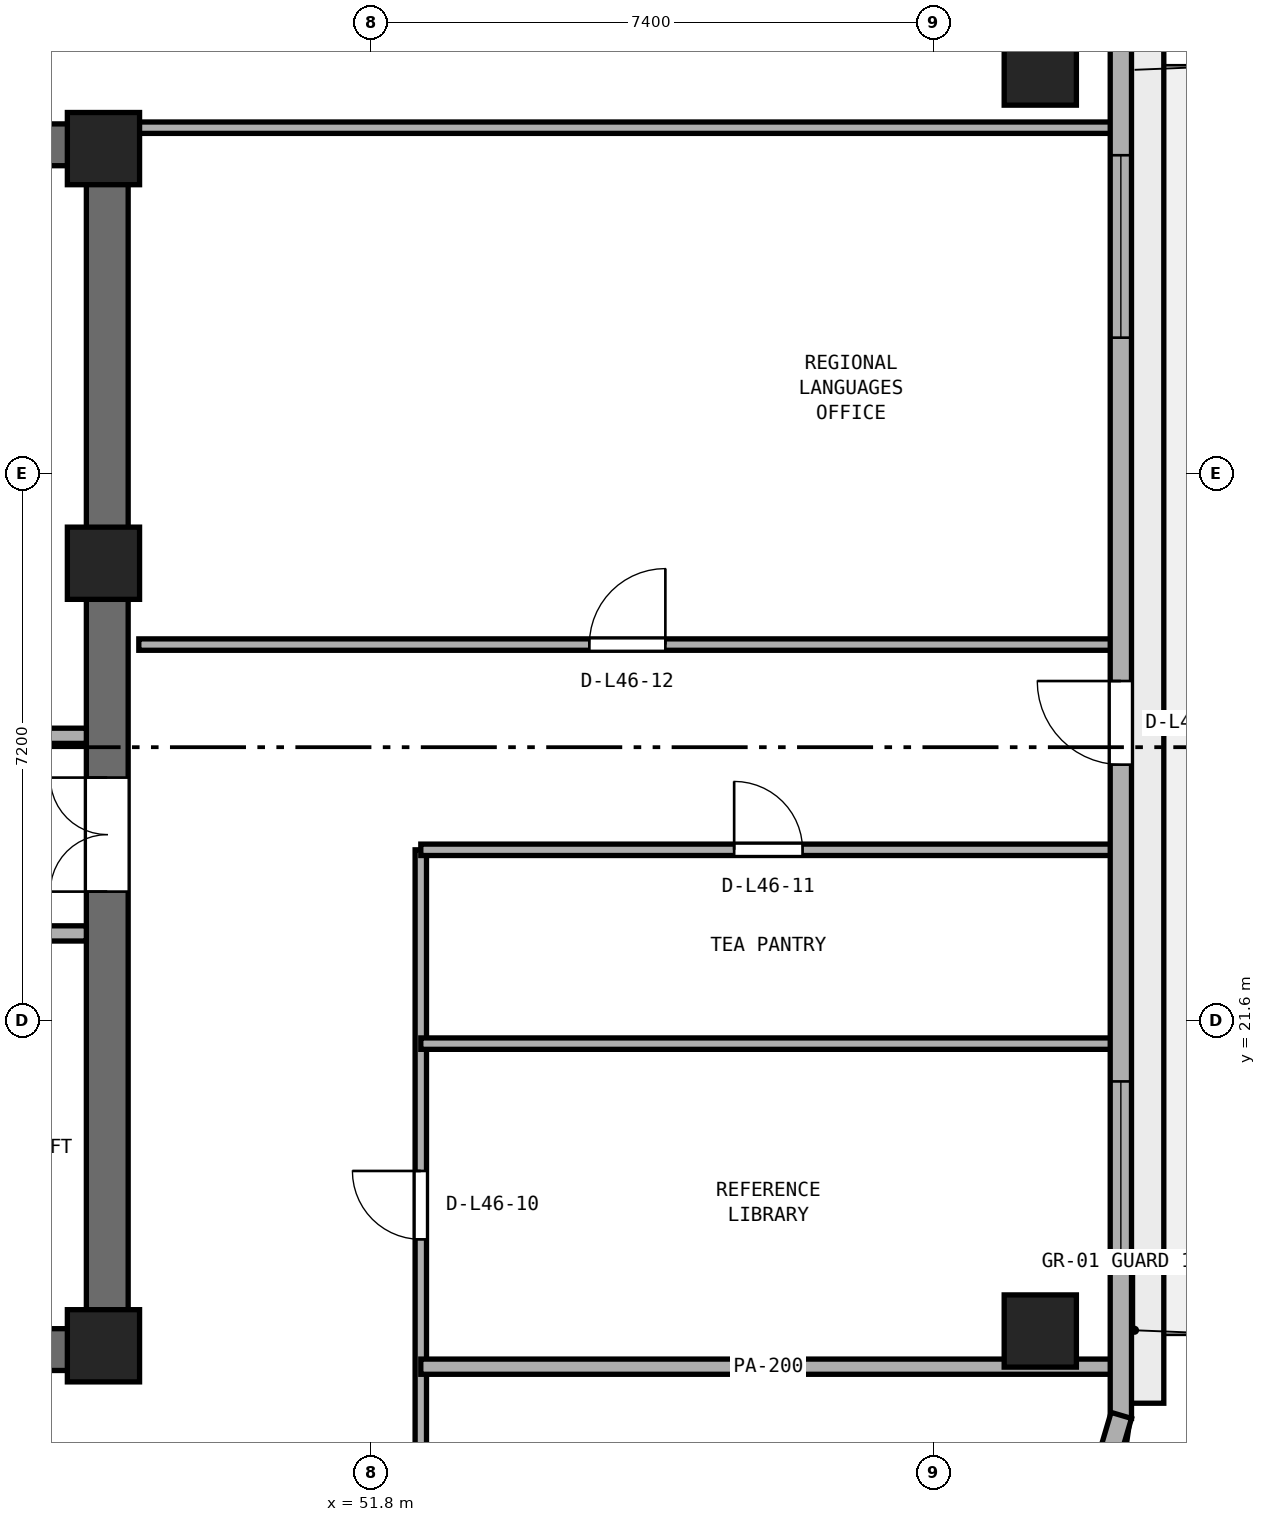
"""IFC4 building model, lengths in metres.
Left out: names, types, materials, properties, quantities, classifications, styles, units other than length and angle.
Written with IfcOpenShell. Run it as: python <this file> out.ifc"""

import sys

from ifc_helpers import new_model, si_unit, direction, frame, frame_2d, origin, origin_2d, place, context, subcontext, project, spatial, rectangle, extrude, element, fill, save


model = new_model("IFC4")
c1 = context("Model", 3, precision=1e-05, world=origin(), true_north=direction((0.0, 1.0)))
c2 = subcontext(c1, "Body", "Model", "MODEL_VIEW")
j1 = project(units=[si_unit("LENGTHUNIT", "METRE"), si_unit("PLANEANGLEUNIT", "RADIAN")], contexts=[c1])
p1 = place(None, origin())
s1 = spatial("IfcSite", under=j1, at=p1, CompositionType="ELEMENT")
p2 = place(p1, origin())
s2 = spatial("IfcBuilding", under=s1, at=p2, CompositionType="ELEMENT")
p3 = place(p2, frame((0.0, 0.0, 182.0)))
s3 = spatial("IfcBuildingStorey", under=s2, at=p3, CompositionType="ELEMENT", Elevation=182.0)
for number, where, z_axis, x_axis in (
    (1, (25.4, 17.275, 0.0), (0.0, 0.0, 1.0), (1.0, 0.0, 0.0)),
    (2, (25.4, 33.125, 0.0), (0.0, 0.0, 1.0), (1.0, 0.0, 0.0)),
):
    element("IfcWall", number, at=place(p3, frame(where, z_axis=z_axis, x_axis=x_axis)), inside=s3, PredefinedType="SHEAR", context=c2, shape_type="SweptSolid", body=[
        extrude(rectangle(XDim=23.2, YDim=0.55, at=frame_2d((11.6, 0.0))), origin(), (0.0, 0.0, 1.0), 3.54),
    ])
p4 = place(p3, frame((48.325, 17.55, 0.0), z_axis=(0.0, 0.0, 1.0), x_axis=(0.0, 1.0, 0.0)))
e3 = element("IfcWall", 3, at=p4, inside=s3, PredefinedType="SHEAR", context=c2, shape_type="SweptSolid", body=[
    extrude(rectangle(XDim=15.3, YDim=0.55, at=frame_2d((7.65, 0.0))), origin(), (0.0, 0.0, 1.0), 3.54),
])
p5 = place(p4, frame((5.75, 0.0, 0.0)))
e4 = element("IfcOpeningElement", 4, at=p5, cuts=e3, PredefinedType="OPENING", context=c2, shape_type="SweptSolid", body=[
    extrude(rectangle(XDim=1.5, YDim=2.15, at=frame_2d((0.75, 1.075))), frame((0.0, 0.285, 0.0), z_axis=(0.0, -1.0, 0.0), x_axis=(1.0, 0.0, 0.0)), (0.0, 0.0, 1.0), 0.57),
])
for number, where, z_axis, x_axis in (
    (5, (48.275, 17.325, 0.0), (0.0, 0.0, 1.0), (1.0, 0.0, 0.0)),
    (6, (48.275, 27.62, 0.0), (0.0, 0.0, 1.0), (1.0, 0.0, 0.0)),
    (7, (48.275, 33.075, 0.0), (0.0, 0.0, 1.0), (1.0, 0.0, 0.0)),
):
    element("IfcColumn", number, at=place(p3, frame(where, z_axis=z_axis, x_axis=x_axis)), inside=s3, PredefinedType="PILASTER", context=c2, shape_type="SweptSolid", body=[
        extrude(rectangle(XDim=0.95, YDim=0.95, at=origin_2d()), origin(), (0.0, 0.0, 1.0), 3.8),
    ])
for number, where, z_axis, x_axis in (
    (8, (60.6, 17.519, 0.0), (0.0, 0.0, 1.0), (1.0, 0.0, 0.0)),
    (9, (60.6, 34.122, 0.0), (0.0, 0.0, 1.0), (1.0, 0.0, 0.0)),
):
    element("IfcColumn", number, at=place(p3, frame(where, z_axis=z_axis, x_axis=x_axis)), inside=s3, PredefinedType="COLUMN", context=c2, shape_type="SweptSolid", body=[
        extrude(rectangle(XDim=0.95, YDim=0.95, at=origin_2d()), origin(), (0.0, 0.0, 1.0), 3.8),
    ])
p6 = place(p3, frame((42.0, 22.75, 0.0), z_axis=(0.0, 0.0, 1.0), x_axis=(1.0, 0.0, 0.0)))
e10 = element("IfcWall", 10, at=p6, inside=s3, PredefinedType="SOLIDWALL", context=c2, shape_type="SweptSolid", body=[
    extrude(rectangle(XDim=6.05, YDim=0.2, at=frame_2d((3.025, 0.0))), origin(), (0.0, 0.0, 1.0), 3.54),
])
p7 = place(p3, frame((46.1, 25.35, 0.0), z_axis=(0.0, 0.0, 1.0), x_axis=(1.0, 0.0, 0.0)))
e11 = element("IfcWall", 11, at=p7, inside=s3, PredefinedType="SOLIDWALL", context=c2, shape_type="SweptSolid", body=[
    extrude(rectangle(XDim=1.95, YDim=0.2, at=frame_2d((0.975, 0.0))), origin(), (0.0, 0.0, 1.0), 3.54),
])
p8 = place(p3, frame((52.45, 13.15, 0.0), z_axis=(0.0, 0.0, 1.0), x_axis=(0.0, 1.0, 0.0)))
e12 = element("IfcWall", 12, at=p8, inside=s3, PredefinedType="PARTITIONING", context=c2, shape_type="SweptSolid", body=[
    extrude(rectangle(XDim=10.7, YDim=0.15, at=frame_2d((5.35, 0.0))), origin(), (0.0, 0.0, 1.0), 3.54),
])
p9 = place(p8, frame((5.575, 0.0, 0.0)))
e13 = element("IfcOpeningElement", 13, at=p9, cuts=e12, PredefinedType="OPENING", context=c2, shape_type="SweptSolid", body=[
    extrude(rectangle(XDim=0.9, YDim=2.1, at=frame_2d((0.45, 1.05))), frame((0.0, 0.085, 0.0), z_axis=(0.0, -1.0, 0.0), x_axis=(1.0, 0.0, 0.0)), (0.0, 0.0, 1.0), 0.17),
])
p10 = place(p3, frame((52.45, 17.05, 0.0), z_axis=(0.0, 0.0, 1.0), x_axis=(1.0, 0.0, 0.0)))
e14 = element("IfcWall", 14, at=p10, inside=s3, PredefinedType="PARTITIONING", context=c2, shape_type="SweptSolid", body=[
    extrude(rectangle(XDim=9.145, YDim=0.2, at=frame_2d((4.573, 0.0))), origin(), (0.0, 0.0, 1.0), 3.54),
])
p11 = place(p3, frame((52.45, 21.3, 0.0), z_axis=(0.0, 0.0, 1.0), x_axis=(1.0, 0.0, 0.0)))
e15 = element("IfcWall", 15, at=p11, inside=s3, PredefinedType="PARTITIONING", context=c2, shape_type="SweptSolid", body=[
    extrude(rectangle(XDim=9.145, YDim=0.15, at=frame_2d((4.573, 0.0))), origin(), (0.0, 0.0, 1.0), 3.54),
])
p12 = place(p3, frame((52.45, 23.85, 0.0), z_axis=(0.0, 0.0, 1.0), x_axis=(1.0, 0.0, 0.0)))
e16 = element("IfcWall", 16, at=p12, inside=s3, PredefinedType="PARTITIONING", context=c2, shape_type="SweptSolid", body=[
    extrude(rectangle(XDim=9.145, YDim=0.15, at=frame_2d((4.573, 0.0))), origin(), (0.0, 0.0, 1.0), 3.54),
])
p13 = place(p12, frame((4.123, 0.0, 0.0)))
e17 = element("IfcOpeningElement", 17, at=p13, cuts=e16, PredefinedType="OPENING", context=c2, shape_type="SweptSolid", body=[
    extrude(rectangle(XDim=0.9, YDim=2.1, at=frame_2d((0.45, 1.05))), frame((0.0, 0.085, 0.0), z_axis=(0.0, -1.0, 0.0), x_axis=(1.0, 0.0, 0.0)), (0.0, 0.0, 1.0), 0.17),
])
p14 = place(p3, frame((48.74, 26.55, 0.0), z_axis=(0.0, 0.0, 1.0), x_axis=(1.0, 0.0, 0.0)))
e18 = element("IfcWall", 18, at=p14, inside=s3, PredefinedType="PARTITIONING", context=c2, shape_type="SweptSolid", body=[
    extrude(rectangle(XDim=12.855, YDim=0.15, at=frame_2d((6.427, 0.0))), origin(), (0.0, 0.0, 1.0), 3.54),
])
p15 = place(p14, frame((5.927, 0.0, 0.0)))
e19 = element("IfcOpeningElement", 19, at=p15, cuts=e18, PredefinedType="OPENING", context=c2, shape_type="SweptSolid", body=[
    extrude(rectangle(XDim=1.0, YDim=2.12, at=frame_2d((0.5, 1.06))), frame((0.0, 0.085, 0.0), z_axis=(0.0, -1.0, 0.0), x_axis=(1.0, 0.0, 0.0)), (0.0, 0.0, 1.0), 0.17),
])
p16 = place(p3, frame((48.74, 33.35, 0.0), z_axis=(0.0, 0.0, 1.0), x_axis=(1.0, 0.0, 0.0)))
e20 = element("IfcWall", 20, at=p16, inside=s3, PredefinedType="PARTITIONING", context=c2, shape_type="SweptSolid", body=[
    extrude(rectangle(XDim=12.855, YDim=0.15, at=frame_2d((6.427, 0.0))), origin(), (0.0, 0.0, 1.0), 2.923),
])
p17 = place(p3, frame((61.66, 16.369, 0.0), z_axis=(0.0, 0.0, 1.0), x_axis=(0.0, 1.0, 0.0)))
e21 = element("IfcWall", 21, at=p17, inside=s3, PredefinedType="STANDARD", context=c2, shape_type="SweptSolid", body=[
    extrude(rectangle(XDim=18.902, YDim=0.28, at=frame_2d((9.451, 0.0))), origin(), (0.0, 0.0, 1.0), 3.54),
])
p18 = place(p17, frame((8.601, 0.0, 0.0)))
e22 = element("IfcOpeningElement", 22, at=p18, cuts=e21, PredefinedType="OPENING", context=c2, shape_type="SweptSolid", body=[
    extrude(rectangle(XDim=1.1, YDim=2.2, at=frame_2d((0.55, 1.1))), frame((0.0, 0.15, 0.0), z_axis=(0.0, -1.0, 0.0), x_axis=(1.0, 0.0, 0.0)), (0.0, 0.0, 1.0), 0.3),
])
p19 = place(p17, frame((2.034, 0.0, 0.9)))
e23 = element("IfcOpeningElement", 23, at=p19, cuts=e21, PredefinedType="OPENING", context=c2, shape_type="SweptSolid", body=[
    extrude(rectangle(XDim=2.4, YDim=1.75, at=frame_2d((1.2, 0.875))), frame((0.0, 0.15, 0.0), z_axis=(0.0, -1.0, 0.0), x_axis=(1.0, 0.0, 0.0)), (0.0, 0.0, 1.0), 0.3),
])
p20 = place(p17, frame((14.219, 0.0, 0.9)))
e24 = element("IfcOpeningElement", 24, at=p20, cuts=e21, PredefinedType="OPENING", context=c2, shape_type="SweptSolid", body=[
    extrude(rectangle(XDim=2.4, YDim=1.75, at=frame_2d((1.2, 0.875))), frame((0.0, 0.15, 0.0), z_axis=(0.0, -1.0, 0.0), x_axis=(1.0, 0.0, 0.0)), (0.0, 0.0, 1.0), 0.3),
])
p21 = place(p3, frame((61.086, 14.45, 0.0), z_axis=(0.0, 0.0, 1.0), x_axis=(0.283660953453, 0.958924639107, 0.0)))
e25 = element("IfcWall", 25, at=p21, inside=s3, PredefinedType="STANDARD", context=c2, shape_type="SweptSolid", body=[
    extrude(rectangle(XDim=2.042, YDim=0.28, at=frame_2d((1.021, 0.0))), origin(), (0.0, 0.0, 1.0), 3.54),
])
p22 = place(p5, origin())
e26 = element("IfcDoor", 26, at=p22, inside=s3, OperationType="DOUBLE_DOOR_SINGLE_SWING", PredefinedType="DOOR", context=c2, shape_type="SweptSolid", body=[
    extrude(rectangle(XDim=1.5, YDim=2.15, at=frame_2d((0.75, 1.075))), frame((0.0, 0.025, 0.0), z_axis=(0.0, -1.0, 0.0), x_axis=(1.0, 0.0, 0.0)), (0.0, 0.0, 1.0), 0.05),
])
fill(e4, e26)
p23 = place(p9, origin())
e27 = element("IfcDoor", 27, at=p23, inside=s3, OperationType="SINGLE_SWING_RIGHT", PredefinedType="DOOR", context=c2, shape_type="SweptSolid", body=[
    extrude(rectangle(XDim=0.9, YDim=2.1, at=frame_2d((0.45, 1.05))), frame((0.0, 0.025, 0.0), z_axis=(0.0, -1.0, 0.0), x_axis=(1.0, 0.0, 0.0)), (0.0, 0.0, 1.0), 0.05),
])
fill(e13, e27)
p24 = place(p13, origin())
e28 = element("IfcDoor", 28, at=p24, inside=s3, OperationType="SINGLE_SWING_LEFT", PredefinedType="DOOR", context=c2, shape_type="SweptSolid", body=[
    extrude(rectangle(XDim=0.9, YDim=2.1, at=frame_2d((0.45, 1.05))), frame((0.0, 0.025, 0.0), z_axis=(0.0, -1.0, 0.0), x_axis=(1.0, 0.0, 0.0)), (0.0, 0.0, 1.0), 0.05),
])
fill(e17, e28)
p25 = place(p15, origin())
e29 = element("IfcDoor", 29, at=p25, inside=s3, OperationType="SINGLE_SWING_RIGHT", PredefinedType="DOOR", context=c2, shape_type="SweptSolid", body=[
    extrude(rectangle(XDim=1.0, YDim=2.12, at=frame_2d((0.5, 1.06))), frame((0.0, 0.025, 0.0), z_axis=(0.0, -1.0, 0.0), x_axis=(1.0, 0.0, 0.0)), (0.0, 0.0, 1.0), 0.05),
])
fill(e19, e29)
p26 = place(p18, origin())
e30 = element("IfcDoor", 30, at=p26, inside=s3, OperationType="SINGLE_SWING_RIGHT", PredefinedType="DOOR", context=c2, shape_type="SweptSolid", body=[
    extrude(rectangle(XDim=1.1, YDim=2.2, at=frame_2d((0.55, 1.1))), frame((0.0, 0.025, 0.0), z_axis=(0.0, -1.0, 0.0), x_axis=(1.0, 0.0, 0.0)), (0.0, 0.0, 1.0), 0.05),
])
fill(e22, e30)
p27 = place(p19, origin())
e31 = element("IfcWindow", 31, at=p27, inside=s3, PartitioningType="SINGLE_PANEL", PredefinedType="WINDOW", context=c2, shape_type="SweptSolid", body=[
    extrude(rectangle(XDim=2.4, YDim=1.75, at=frame_2d((1.2, 0.875))), frame((0.0, 0.03, 0.0), z_axis=(0.0, -1.0, 0.0), x_axis=(1.0, 0.0, 0.0)), (0.0, 0.0, 1.0), 0.06),
])
fill(e23, e31)
p28 = place(p20, origin())
e32 = element("IfcWindow", 32, at=p28, inside=s3, PartitioningType="SINGLE_PANEL", PredefinedType="WINDOW", context=c2, shape_type="SweptSolid", body=[
    extrude(rectangle(XDim=2.4, YDim=1.75, at=frame_2d((1.2, 0.875))), frame((0.0, 0.03, 0.0), z_axis=(0.0, -1.0, 0.0), x_axis=(1.0, 0.0, 0.0)), (0.0, 0.0, 1.0), 0.06),
])
fill(e24, e32)
save(model, sys.argv[1])
